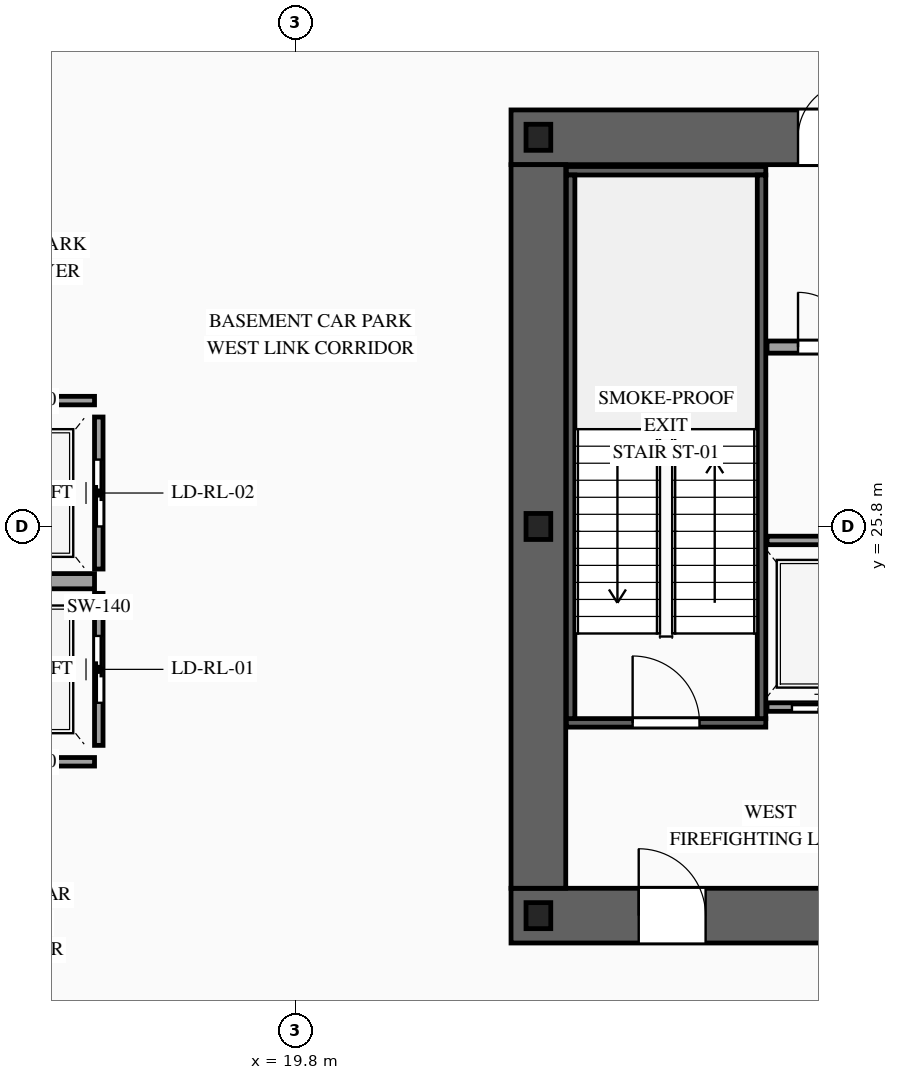
"""IFC4 building model, lengths in metres.
Left out: names, types, materials, properties, quantities, classifications, styles, units other than length and angle.
Written with IfcOpenShell. Run it as: python <this file> out.ifc"""

import sys

from ifc_helpers import new_model, si_unit, direction, frame, frame_2d, origin, origin_2d, place, context, subcontext, project, spatial, rectangle, i_section, extrude, source, transform, mapped, element, fill, save


model = new_model("IFC4")
c1 = context("Model", 3, precision=1e-05, world=origin(), true_north=direction((0.0, 1.0)))
c2 = subcontext(c1, "Body", "Model", "MODEL_VIEW")
j1 = project(units=[si_unit("LENGTHUNIT", "METRE"), si_unit("PLANEANGLEUNIT", "RADIAN")], contexts=[c1])
p1 = place(None, origin())
s1 = spatial("IfcSite", under=j1, at=p1, CompositionType="ELEMENT")
p2 = place(p1, origin())
s2 = spatial("IfcBuilding", under=s1, at=p2, CompositionType="ELEMENT")
p3 = place(p2, frame((0.0, 0.0, -9.0)))
s3 = spatial("IfcBuildingStorey", under=s2, at=p3, CompositionType="ELEMENT", Elevation=-9.0)
p4 = place(p3, frame((23.35, 19.4, 0.0), z_axis=(0.0, 0.0, 1.0), x_axis=(1.0, 0.0, 0.0)))
e1 = element("IfcWall", 1, at=p4, inside=s3, PredefinedType="SHEAR", context=c2, shape_type="SweptSolid", body=[
    extrude(rectangle(XDim=27.3, YDim=0.9, at=frame_2d((13.65, 0.0))), origin(), (0.0, 0.0, 1.0), 4.5),
])
p5 = place(p4, frame((2.1, 0.0, 0.0)))
e2 = element("IfcOpeningElement", 2, at=p5, cuts=e1, PredefinedType="OPENING", context=c2, shape_type="SweptSolid", body=[
    extrude(rectangle(XDim=1.1, YDim=2.2, at=frame_2d((0.55, 1.1))), frame((0.0, 0.465, 0.0), z_axis=(0.0, -1.0, 0.0), x_axis=(1.0, 0.0, 0.0)), (0.0, 0.0, 1.0), 0.93),
])
p6 = place(p4, frame((10.0, 0.0, 0.0)))
e3 = element("IfcOpeningElement", 3, at=p6, cuts=e1, PredefinedType="OPENING", context=c2, shape_type="SweptSolid", body=[
    extrude(rectangle(XDim=1.1, YDim=2.2, at=frame_2d((0.55, 1.1))), frame((0.0, 0.465, 0.0), z_axis=(0.0, -1.0, 0.0), x_axis=(1.0, 0.0, 0.0)), (0.0, 0.0, 1.0), 0.93),
])
p7 = place(p4, frame((23.2, 0.0, 0.0)))
e4 = element("IfcOpeningElement", 4, at=p7, cuts=e1, PredefinedType="OPENING", context=c2, shape_type="SweptSolid", body=[
    extrude(rectangle(XDim=1.1, YDim=2.2, at=frame_2d((0.55, 1.1))), frame((0.0, 0.465, 0.0), z_axis=(0.0, -1.0, 0.0), x_axis=(1.0, 0.0, 0.0)), (0.0, 0.0, 1.0), 0.93),
])
p8 = place(p4, frame((19.82, 0.0, 0.0)))
e5 = element("IfcOpeningElement", 5, at=p8, cuts=e1, PredefinedType="OPENING", context=c2, shape_type="SweptSolid", body=[
    extrude(rectangle(XDim=0.9, YDim=2.15, at=frame_2d((0.45, 1.075))), frame((0.0, 0.465, 0.0), z_axis=(0.0, -1.0, 0.0), x_axis=(1.0, 0.0, 0.0)), (0.0, 0.0, 1.0), 0.93),
])
p9 = place(p4, frame((18.38, 0.0, 0.0)))
e6 = element("IfcOpeningElement", 6, at=p9, cuts=e1, PredefinedType="OPENING", context=c2, shape_type="SweptSolid", body=[
    extrude(rectangle(XDim=0.9, YDim=2.15, at=frame_2d((0.45, 1.075))), frame((0.0, 0.465, 0.0), z_axis=(0.0, -1.0, 0.0), x_axis=(1.0, 0.0, 0.0)), (0.0, 0.0, 1.0), 0.93),
])
p10 = place(p3, frame((23.35, 32.2, 0.0), z_axis=(0.0, 0.0, 1.0), x_axis=(1.0, 0.0, 0.0)))
e7 = element("IfcWall", 7, at=p10, inside=s3, PredefinedType="SHEAR", context=c2, shape_type="SweptSolid", body=[
    extrude(rectangle(XDim=27.3, YDim=0.9, at=frame_2d((13.65, 0.0))), origin(), (0.0, 0.0, 1.0), 4.5),
])
p11 = place(p10, frame((4.72, 0.0, 0.0)))
e8 = element("IfcOpeningElement", 8, at=p11, cuts=e7, PredefinedType="OPENING", context=c2, shape_type="SweptSolid", body=[
    extrude(rectangle(XDim=0.9, YDim=2.15, at=frame_2d((0.45, 1.075))), frame((0.0, 0.465, 0.0), z_axis=(0.0, -1.0, 0.0), x_axis=(1.0, 0.0, 0.0)), (0.0, 0.0, 1.0), 0.93),
])
p12 = place(p10, frame((10.0, 0.0, 0.0)))
e9 = element("IfcOpeningElement", 9, at=p12, cuts=e7, PredefinedType="OPENING", context=c2, shape_type="SweptSolid", body=[
    extrude(rectangle(XDim=1.1, YDim=2.2, at=frame_2d((0.55, 1.1))), frame((0.0, 0.465, 0.0), z_axis=(0.0, -1.0, 0.0), x_axis=(1.0, 0.0, 0.0)), (0.0, 0.0, 1.0), 0.93),
])
p13 = place(p10, frame((15.85, 0.0, 0.0)))
e10 = element("IfcOpeningElement", 10, at=p13, cuts=e7, PredefinedType="OPENING", context=c2, shape_type="SweptSolid", body=[
    extrude(rectangle(XDim=1.1, YDim=2.2, at=frame_2d((0.55, 1.1))), frame((0.0, 0.465, 0.0), z_axis=(0.0, -1.0, 0.0), x_axis=(1.0, 0.0, 0.0)), (0.0, 0.0, 1.0), 0.93),
])
m1 = source(origin(), c2, "Body", "SweptSolid", [
    extrude(rectangle(XDim=11.9, YDim=0.9, at=frame_2d((5.95, 0.0))), origin(), (0.0, 0.0, 1.0), 4.5),
])
p14 = place(p3, frame((23.8, 19.85, 0.0), z_axis=(0.0, 0.0, 1.0), x_axis=(0.0, 1.0, 0.0)))
e11 = element("IfcWall", 11, at=p14, inside=s3, PredefinedType="SHEAR", context=c2, shape_type="MappedRepresentation", body=[
    mapped(m1, transform((0.0, 0.0, 0.0), scale=1.0)),
])
m2 = source(origin(), c2, "Body", "SweptSolid", [
    extrude(i_section(OverallWidth=0.407, OverallDepth=0.428, WebThickness=0.02, FlangeThickness=0.035, at=origin_2d()), origin(), (0.0, 0.0, 1.0), 4.5),
])
for number, where, z_axis, x_axis in (
    (12, (23.8, 19.4, 0.0), (0.0, 0.0, 1.0), (1.0, 0.0, 0.0)),
    (13, (23.8, 25.8, 0.0), (0.0, 0.0, 1.0), (1.0, 0.0, 0.0)),
    (14, (23.8, 32.2, 0.0), (0.0, 0.0, 1.0), (1.0, 0.0, 0.0)),
):
    element("IfcColumn", number, at=place(p3, frame(where, z_axis=z_axis, x_axis=x_axis)), inside=s3, PredefinedType="COLUMN", context=c2, shape_type="MappedRepresentation", body=[
        mapped(m2, transform((0.0, 0.0, 0.0), scale=1.0)),
    ])
p15 = place(p3, frame((27.56, 22.83, 0.0), z_axis=(0.0, 0.0, 1.0), x_axis=(1.0, 0.0, 0.0)))
e15 = element("IfcWall", 15, at=p15, inside=s3, PredefinedType="SOLIDWALL", context=c2, shape_type="SweptSolid", body=[
    extrude(rectangle(XDim=1.92, YDim=0.14, at=frame_2d((0.96, 0.0))), origin(), (0.0, 0.0, 1.0), 4.2),
])
p16 = place(p15, frame((0.41, 0.0, 0.0)))
e16 = element("IfcOpeningElement", 16, at=p16, cuts=e15, PredefinedType="OPENING", context=c2, shape_type="SweptSolid", body=[
    extrude(rectangle(XDim=1.1, YDim=2.2, at=frame_2d((0.55, 1.1))), frame((0.0, 0.085, 0.0), z_axis=(0.0, -1.0, 0.0), x_axis=(1.0, 0.0, 0.0)), (0.0, 0.0, 1.0), 0.17),
])
m3 = source(origin(), c2, "Body", "SweptSolid", [
    extrude(rectangle(XDim=1.92, YDim=0.14, at=frame_2d((0.96, 0.0))), origin(), (0.0, 0.0, 1.0), 4.2),
])
p17 = place(p3, frame((27.56, 25.57, 0.0), z_axis=(0.0, 0.0, 1.0), x_axis=(1.0, 0.0, 0.0)))
e17 = element("IfcWall", 17, at=p17, inside=s3, PredefinedType="SOLIDWALL", context=c2, shape_type="MappedRepresentation", body=[
    mapped(m3, transform((0.0, 0.0, 0.0), scale=1.0)),
])
p18 = place(p3, frame((16.57, 22.2, 0.0), z_axis=(0.0, 0.0, 1.0), x_axis=(0.0, 1.0, 0.0)))
e18 = element("IfcWall", 18, at=p18, inside=s3, PredefinedType="SOLIDWALL", context=c2, shape_type="SweptSolid", body=[
    extrude(rectangle(XDim=2.5, YDim=0.14, at=frame_2d((1.25, 0.0))), origin(), (0.0, 0.0, 1.0), 4.2),
])
p19 = place(p18, frame((0.7, 0.0, 0.0)))
e19 = element("IfcOpeningElement", 19, at=p19, cuts=e18, PredefinedType="OPENING", context=c2, shape_type="SweptSolid", body=[
    extrude(rectangle(XDim=1.1, YDim=2.2, at=frame_2d((0.55, 1.1))), frame((0.0, 0.085, 0.0), z_axis=(0.0, -1.0, 0.0), x_axis=(1.0, 0.0, 0.0)), (0.0, 0.0, 1.0), 0.17),
])
m4 = source(origin(), c2, "Body", "SweptSolid", [
    extrude(rectangle(XDim=2.3, YDim=0.25, at=frame_2d((1.15, 0.0))), origin(), (0.0, 0.0, 1.0), 4.2),
])
p20 = place(p3, frame((14.2, 24.9, 0.0), z_axis=(0.0, 0.0, 1.0), x_axis=(1.0, 0.0, 0.0)))
e20 = element("IfcWall", 20, at=p20, inside=s3, PredefinedType="SOLIDWALL", context=c2, shape_type="MappedRepresentation", body=[
    mapped(m4, transform((0.0, 0.0, 0.0), scale=1.0)),
])
m5 = source(origin(), c2, "Body", "SweptSolid", [
    extrude(rectangle(XDim=2.3, YDim=0.14, at=frame_2d((1.15, 0.0))), origin(), (0.0, 0.0, 1.0), 4.2),
])
p21 = place(p3, frame((14.2, 21.93, 0.0), z_axis=(0.0, 0.0, 1.0), x_axis=(1.0, 0.0, 0.0)))
e21 = element("IfcWall", 21, at=p21, inside=s3, PredefinedType="SOLIDWALL", context=c2, shape_type="MappedRepresentation", body=[
    mapped(m5, transform((0.0, 0.0, 0.0), scale=1.0)),
])
p22 = place(p3, frame((16.57, 25.1, 0.0), z_axis=(0.0, 0.0, 1.0), x_axis=(0.0, 1.0, 0.0)))
e22 = element("IfcWall", 22, at=p22, inside=s3, PredefinedType="SOLIDWALL", context=c2, shape_type="SweptSolid", body=[
    extrude(rectangle(XDim=2.5, YDim=0.14, at=frame_2d((1.25, 0.0))), origin(), (0.0, 0.0, 1.0), 4.2),
])
p23 = place(p22, frame((0.7, 0.0, 0.0)))
e23 = element("IfcOpeningElement", 23, at=p23, cuts=e22, PredefinedType="OPENING", context=c2, shape_type="SweptSolid", body=[
    extrude(rectangle(XDim=1.1, YDim=2.2, at=frame_2d((0.55, 1.1))), frame((0.0, 0.085, 0.0), z_axis=(0.0, -1.0, 0.0), x_axis=(1.0, 0.0, 0.0)), (0.0, 0.0, 1.0), 0.17),
])
p24 = place(p3, frame((14.2, 27.87, 0.0), z_axis=(0.0, 0.0, 1.0), x_axis=(1.0, 0.0, 0.0)))
e24 = element("IfcWall", 24, at=p24, inside=s3, PredefinedType="SOLIDWALL", context=c2, shape_type="MappedRepresentation", body=[
    mapped(m5, transform((0.0, 0.0, 0.0), scale=1.0)),
])
p25 = place(p3, frame((24.26, 22.57, 0.0), z_axis=(0.0, 0.0, 1.0), x_axis=(1.0, 0.0, 0.0)))
e25 = element("IfcWall", 25, at=p25, inside=s3, PredefinedType="SOLIDWALL", context=c2, shape_type="SweptSolid", body=[
    extrude(rectangle(XDim=3.28, YDim=0.14, at=frame_2d((1.64, 0.0))), origin(), (0.0, 0.0, 1.0), 4.2),
])
p26 = place(p25, frame((1.09, 0.0, 0.0)))
e26 = element("IfcOpeningElement", 26, at=p26, cuts=e25, PredefinedType="OPENING", context=c2, shape_type="SweptSolid", body=[
    extrude(rectangle(XDim=1.1, YDim=2.2, at=frame_2d((0.55, 1.1))), frame((0.0, 0.085, 0.0), z_axis=(0.0, -1.0, 0.0), x_axis=(1.0, 0.0, 0.0)), (0.0, 0.0, 1.0), 0.17),
])
m6 = source(origin(), c2, "Body", "SweptSolid", [
    extrude(rectangle(XDim=3.28, YDim=0.14, at=frame_2d((1.64, 0.0))), origin(), (0.0, 0.0, 1.0), 4.2),
])
p27 = place(p3, frame((24.26, 31.65, 0.0), z_axis=(0.0, 0.0, 1.0), x_axis=(1.0, 0.0, 0.0)))
e27 = element("IfcWall", 27, at=p27, inside=s3, PredefinedType="SOLIDWALL", context=c2, shape_type="MappedRepresentation", body=[
    mapped(m6, transform((0.0, 0.0, 0.0), scale=1.0)),
])
m7 = source(origin(), c2, "Body", "SweptSolid", [
    extrude(rectangle(XDim=8.94, YDim=0.14, at=frame_2d((4.47, 0.0))), origin(), (0.0, 0.0, 1.0), 4.2),
])
for number, where, z_axis, x_axis in (
    (28, (24.33, 22.64, 0.0), (0.0, 0.0, 1.0), (0.0, 1.0, 0.0)),
    (29, (27.47, 22.64, 0.0), (0.0, 0.0, 1.0), (0.0, 1.0, 0.0)),
):
    element("IfcWall", number, at=place(p3, frame(where, z_axis=z_axis, x_axis=x_axis)), inside=s3, PredefinedType="SOLIDWALL", context=c2, shape_type="MappedRepresentation", body=[
        mapped(m7, transform((0.0, 0.0, 0.0), scale=1.0)),
    ])
p28 = place(p3, frame((27.56, 28.75, 0.0), z_axis=(0.0, 0.0, 1.0), x_axis=(1.0, 0.0, 0.0)))
e30 = element("IfcWall", 30, at=p28, inside=s3, PredefinedType="PARTITIONING", context=c2, shape_type="SweptSolid", body=[
    extrude(rectangle(XDim=1.92, YDim=0.2, at=frame_2d((0.96, 0.0))), origin(), (0.0, 0.0, 1.0), 4.2),
])
p29 = place(p28, frame((0.51, 0.0, 0.0)))
e31 = element("IfcOpeningElement", 31, at=p29, cuts=e30, PredefinedType="OPENING", context=c2, shape_type="SweptSolid", body=[
    extrude(rectangle(XDim=0.9, YDim=2.15, at=frame_2d((0.45, 1.075))), frame((0.0, 0.115, 0.0), z_axis=(0.0, -1.0, 0.0), x_axis=(1.0, 0.0, 0.0)), (0.0, 0.0, 1.0), 0.23),
])
m8 = source(origin(), c2, "Body", "SweptSolid", [
    extrude(rectangle(XDim=1.1, YDim=2.2, at=frame_2d((0.55, 1.1))), frame((0.0, 0.025, 0.0), z_axis=(0.0, -1.0, 0.0), x_axis=(1.0, 0.0, 0.0)), (0.0, 0.0, 1.0), 0.05),
])
p30 = place(p16, origin())
e32 = element("IfcDoor", 32, at=p30, inside=s3, OperationType="SLIDING_TO_LEFT", PredefinedType="DOOR", context=c2, shape_type="MappedRepresentation", body=[
    mapped(m8, transform((0.0, 0.0, 0.0), scale=1.0)),
])
fill(e16, e32)
p31 = place(p19, origin())
e33 = element("IfcDoor", 33, at=p31, inside=s3, OperationType="SLIDING_TO_RIGHT", PredefinedType="DOOR", context=c2, shape_type="MappedRepresentation", body=[
    mapped(m8, transform((0.0, 0.0, 0.0), scale=1.0)),
])
fill(e19, e33)
p32 = place(p23, origin())
e34 = element("IfcDoor", 34, at=p32, inside=s3, OperationType="SLIDING_TO_LEFT", PredefinedType="DOOR", context=c2, shape_type="MappedRepresentation", body=[
    mapped(m8, transform((0.0, 0.0, 0.0), scale=1.0)),
])
fill(e23, e34)
m9 = source(origin(), c2, "Body", "SweptSolid", [
    extrude(rectangle(XDim=1.1, YDim=2.2, at=frame_2d((0.55, 1.1))), frame((0.0, 0.025, 0.0), z_axis=(0.0, -1.0, 0.0), x_axis=(1.0, 0.0, 0.0)), (0.0, 0.0, 1.0), 0.05),
])
p33 = place(p26, origin())
e35 = element("IfcDoor", 35, at=p33, inside=s3, OperationType="SINGLE_SWING_LEFT", PredefinedType="DOOR", context=c2, shape_type="MappedRepresentation", body=[
    mapped(m9, transform((0.0, 0.0, 0.0), scale=1.0)),
])
fill(e26, e35)
p34 = place(p5, origin())
e36 = element("IfcDoor", 36, at=p34, inside=s3, OperationType="SINGLE_SWING_LEFT", PredefinedType="DOOR", context=c2, shape_type="MappedRepresentation", body=[
    mapped(m9, transform((0.0, 0.0, 0.0), scale=1.0)),
])
fill(e2, e36)
m10 = source(origin(), c2, "Body", "SweptSolid", [
    extrude(rectangle(XDim=0.9, YDim=2.15, at=frame_2d((0.45, 1.075))), frame((0.0, 0.025, 0.0), z_axis=(0.0, -1.0, 0.0), x_axis=(1.0, 0.0, 0.0)), (0.0, 0.0, 1.0), 0.05),
])
p35 = place(p11, origin())
e37 = element("IfcDoor", 37, at=p35, inside=s3, OperationType="SINGLE_SWING_RIGHT", PredefinedType="DOOR", context=c2, shape_type="MappedRepresentation", body=[
    mapped(m10, transform((0.0, 0.0, 0.0), scale=1.0)),
])
fill(e8, e37)
p36 = place(p29, origin())
e38 = element("IfcDoor", 38, at=p36, inside=s3, OperationType="SINGLE_SWING_LEFT", PredefinedType="DOOR", context=c2, shape_type="MappedRepresentation", body=[
    mapped(m10, transform((0.0, 0.0, 0.0), scale=1.0)),
])
fill(e31, e38)
save(model, sys.argv[1])
